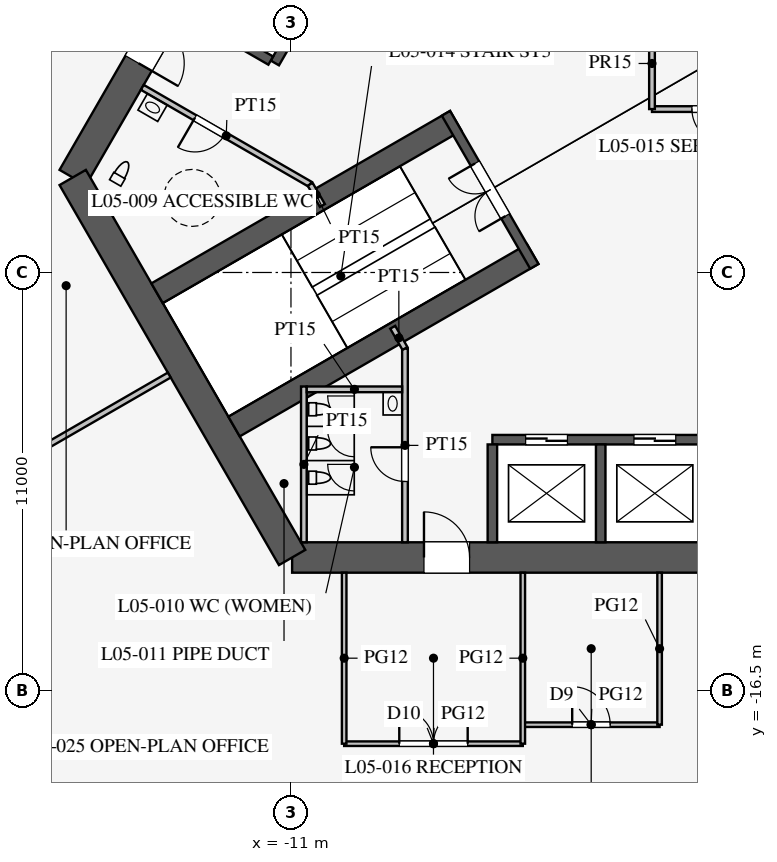
"""IFC4 building model, lengths in metres.
Left out: names, types, materials, properties, quantities, classifications, styles, units other than length and angle.
Written with IfcOpenShell. Run it as: python <this file> out.ifc"""

import sys

from ifc_helpers import new_model, si_unit, direction, frame, frame_2d, origin, place, context, subcontext, project, spatial, rectangle, extrude, element, fill, save


model = new_model("IFC4")
c1 = context("Model", 3, precision=1e-05, world=origin(), true_north=direction((0.0, 1.0)))
c2 = subcontext(c1, "Body", "Model", "MODEL_VIEW")
j1 = project(units=[si_unit("LENGTHUNIT", "METRE"), si_unit("PLANEANGLEUNIT", "RADIAN")], contexts=[c1])
p1 = place(None, origin())
s1 = spatial("IfcSite", under=j1, at=p1, CompositionType="ELEMENT")
p2 = place(p1, origin())
s2 = spatial("IfcBuilding", under=s1, at=p2, CompositionType="ELEMENT")
p3 = place(p2, frame((0.0, 0.0, 24.9)))
s3 = spatial("IfcBuildingStorey", under=s2, at=p3, CompositionType="ELEMENT", Elevation=24.9)
p4 = place(p3, frame((-10.97, -13.0, 0.0), z_axis=(0.0, 0.0, 1.0), x_axis=(1.0, 0.0, 0.0)))
e1 = element("IfcWall", 1, at=p4, inside=s3, PredefinedType="SHEAR", context=c2, shape_type="SweptSolid", body=[
    extrude(rectangle(XDim=21.939, YDim=0.8, at=frame_2d((10.97, 0.0))), origin(), (0.0, 0.0, 1.0), 4.2),
])
p5 = place(p4, frame((17.27, 0.0, 0.0)))
e2 = element("IfcOpeningElement", 2, at=p5, cuts=e1, PredefinedType="OPENING", context=c2, shape_type="SweptSolid", body=[
    extrude(rectangle(XDim=1.2, YDim=2.1, at=frame_2d((0.6, 1.05))), frame((0.0, 0.41, 0.0), z_axis=(0.0, -1.0, 0.0), x_axis=(1.0, 0.0, 0.0)), (0.0, 0.0, 1.0), 0.82),
])
p6 = place(p4, frame((3.47, 0.0, 0.0)))
e3 = element("IfcOpeningElement", 3, at=p6, cuts=e1, PredefinedType="OPENING", context=c2, shape_type="SweptSolid", body=[
    extrude(rectangle(XDim=1.2, YDim=2.1, at=frame_2d((0.6, 1.05))), frame((0.0, 0.41, 0.0), z_axis=(0.0, -1.0, 0.0), x_axis=(1.0, 0.0, 0.0)), (0.0, 0.0, 1.0), 0.82),
])
p7 = place(p3, frame((-5.773, 16.0, 0.0), z_axis=(0.0, 0.0, 1.0), x_axis=(-0.500002442456, -0.866023993627, 0.0)))
e4 = element("IfcWall", 4, at=p7, inside=s3, PredefinedType="SHEAR", context=c2, shape_type="SweptSolid", body=[
    extrude(rectangle(XDim=21.939, YDim=0.8, at=frame_2d((10.97, 0.0))), origin(), (0.0, 0.0, 1.0), 4.2),
])
p8 = place(p7, frame((17.27, 0.0, 0.0)))
e5 = element("IfcOpeningElement", 5, at=p8, cuts=e4, PredefinedType="OPENING", context=c2, shape_type="SweptSolid", body=[
    extrude(rectangle(XDim=1.2, YDim=2.1, at=frame_2d((0.6, 1.05))), frame((0.0, 0.41, 0.0), z_axis=(0.0, -1.0, 0.0), x_axis=(1.0, 0.0, 0.0)), (0.0, 0.0, 1.0), 0.82),
])
p9 = place(p7, frame((3.47, 0.0, 0.0)))
e6 = element("IfcOpeningElement", 6, at=p9, cuts=e4, PredefinedType="OPENING", context=c2, shape_type="SweptSolid", body=[
    extrude(rectangle(XDim=1.2, YDim=2.1, at=frame_2d((0.6, 1.05))), frame((0.0, 0.41, 0.0), z_axis=(0.0, -1.0, 0.0), x_axis=(1.0, 0.0, 0.0)), (0.0, 0.0, 1.0), 0.82),
])
p10 = place(p3, frame((-16.743, -3.0, 0.0), z_axis=(0.0, 0.0, 1.0), x_axis=(0.499995765644, -0.866027848477, 0.0)))
e7 = element("IfcWall", 7, at=p10, inside=s3, PredefinedType="SHEAR", context=c2, shape_type="SweptSolid", body=[
    extrude(rectangle(XDim=11.547, YDim=0.8, at=frame_2d((5.773, 0.0))), origin(), (0.0, 0.0, 1.0), 4.2),
])
p11 = place(p3, frame((-5.7, -9.9, 0.0), z_axis=(0.0, 0.0, 1.0), x_axis=(1.0, 0.0, 0.0)))
e8 = element("IfcWall", 8, at=p11, inside=s3, PredefinedType="SHEAR", context=c2, shape_type="SweptSolid", body=[
    extrude(rectangle(XDim=11.4, YDim=0.25, at=frame_2d((5.7, 0.0))), origin(), (0.0, 0.0, 1.0), 4.2),
])
p12 = place(p11, frame((0.875, 0.0, 0.0)))
e9 = element("IfcOpeningElement", 9, at=p12, cuts=e8, PredefinedType="OPENING", context=c2, shape_type="SweptSolid", body=[
    extrude(rectangle(XDim=1.1, YDim=2.2, at=frame_2d((0.55, 1.1))), frame((0.0, 0.135, 0.0), z_axis=(0.0, -1.0, 0.0), x_axis=(1.0, 0.0, 0.0)), (0.0, 0.0, 1.0), 0.27),
])
p13 = place(p11, frame((3.725, 0.0, 0.0)))
e10 = element("IfcOpeningElement", 10, at=p13, cuts=e8, PredefinedType="OPENING", context=c2, shape_type="SweptSolid", body=[
    extrude(rectangle(XDim=1.1, YDim=2.2, at=frame_2d((0.55, 1.1))), frame((0.0, 0.135, 0.0), z_axis=(0.0, -1.0, 0.0), x_axis=(1.0, 0.0, 0.0)), (0.0, 0.0, 1.0), 0.27),
])
p14 = place(p11, frame((6.575, 0.0, 0.0)))
e11 = element("IfcOpeningElement", 11, at=p14, cuts=e8, PredefinedType="OPENING", context=c2, shape_type="SweptSolid", body=[
    extrude(rectangle(XDim=1.1, YDim=2.2, at=frame_2d((0.55, 1.1))), frame((0.0, 0.135, 0.0), z_axis=(0.0, -1.0, 0.0), x_axis=(1.0, 0.0, 0.0)), (0.0, 0.0, 1.0), 0.27),
])
p15 = place(p11, frame((9.425, 0.0, 0.0)))
e12 = element("IfcOpeningElement", 12, at=p15, cuts=e8, PredefinedType="OPENING", context=c2, shape_type="SweptSolid", body=[
    extrude(rectangle(XDim=1.1, YDim=2.2, at=frame_2d((0.55, 1.1))), frame((0.0, 0.135, 0.0), z_axis=(0.0, -1.0, 0.0), x_axis=(1.0, 0.0, 0.0)), (0.0, 0.0, 1.0), 0.27),
])
for number, where, z_axis, x_axis in (
    (13, (-5.7, -10.025, 0.0), (0.0, 0.0, 1.0), (0.0, -1.0, 0.0)),
    (14, (-2.85, -10.025, 0.0), (0.0, 0.0, 1.0), (0.0, -1.0, 0.0)),
):
    element("IfcWall", number, at=place(p3, frame(where, z_axis=z_axis, x_axis=x_axis)), inside=s3, PredefinedType="SHEAR", context=c2, shape_type="SweptSolid", body=[
        extrude(rectangle(XDim=2.575, YDim=0.25, at=frame_2d((1.288, 0.0))), origin(), (0.0, 0.0, 1.0), 4.2),
    ])
p16 = place(p3, frame((-5.724, 9.886, 0.0), z_axis=(0.0, 0.0, 1.0), x_axis=(-0.500001763848, -0.866024385424, 0.0)))
e15 = element("IfcWall", 15, at=p16, inside=s3, PredefinedType="SHEAR", context=c2, shape_type="SweptSolid", body=[
    extrude(rectangle(XDim=11.4, YDim=0.25, at=frame_2d((5.7, 0.0))), origin(), (0.0, 0.0, 1.0), 4.2),
])
p17 = place(p16, frame((6.525, 0.0, 0.0)))
e16 = element("IfcOpeningElement", 16, at=p17, cuts=e15, PredefinedType="OPENING", context=c2, shape_type="SweptSolid", body=[
    extrude(rectangle(XDim=1.2, YDim=2.2, at=frame_2d((0.6, 1.1))), frame((0.0, 0.135, 0.0), z_axis=(0.0, -1.0, 0.0), x_axis=(1.0, 0.0, 0.0)), (0.0, 0.0, 1.0), 0.27),
])
p18 = place(p16, frame((9.375, 0.0, 0.0)))
e17 = element("IfcOpeningElement", 17, at=p18, cuts=e15, PredefinedType="OPENING", context=c2, shape_type="SweptSolid", body=[
    extrude(rectangle(XDim=1.2, YDim=2.2, at=frame_2d((0.6, 1.1))), frame((0.0, 0.135, 0.0), z_axis=(0.0, -1.0, 0.0), x_axis=(1.0, 0.0, 0.0)), (0.0, 0.0, 1.0), 0.27),
])
p19 = place(p3, frame((-11.532, 0.076, 0.0), z_axis=(0.0, 0.0, 1.0), x_axis=(-0.866005588531, 0.500034319456, 0.0)))
e18 = element("IfcWall", 18, at=p19, inside=s3, PredefinedType="SHEAR", context=c2, shape_type="SweptSolid", body=[
    extrude(rectangle(XDim=2.575, YDim=0.25, at=frame_2d((1.288, 0.0))), origin(), (0.0, 0.0, 1.0), 4.2),
])
for number, where, z_axis, x_axis in (
    (19, (-6.663, -1.509, 0.0), (0.0, 0.0, 1.0), (-0.866, -0.5, 0.0)),
    (20, (-4.638, -5.016, 0.0), (0.0, 0.0, 1.0), (-0.866, -0.5, 0.0)),
):
    element("IfcWall", number, at=place(p3, frame(where, z_axis=z_axis, x_axis=x_axis)), inside=s3, PredefinedType="SHEAR", context=c2, shape_type="SweptSolid", body=[
        extrude(rectangle(XDim=9.075, YDim=0.6, at=frame_2d((4.538, 0.0))), origin(), (0.0, 0.0, 1.0), 4.2),
    ])
p20 = place(p3, frame((-6.922, -1.312, 0.0), z_axis=(0.0, 0.0, 1.0), x_axis=(0.499984536904, -0.866034331223, 0.0)))
e21 = element("IfcWall", 21, at=p20, inside=s3, PredefinedType="SHEAR", context=c2, shape_type="SweptSolid", body=[
    extrude(rectangle(XDim=4.65, YDim=0.25, at=frame_2d((2.325, 0.0))), origin(), (0.0, 0.0, 1.0), 4.2),
])
p21 = place(p20, frame((1.525, 0.0, 0.0)))
e22 = element("IfcOpeningElement", 22, at=p21, cuts=e21, PredefinedType="OPENING", context=c2, shape_type="SweptSolid", body=[
    extrude(rectangle(XDim=1.6, YDim=2.1, at=frame_2d((0.8, 1.05))), frame((0.0, 0.135, 0.0), z_axis=(0.0, -1.0, 0.0), x_axis=(1.0, 0.0, 0.0)), (0.0, 0.0, 1.0), 0.27),
])
p22 = place(p3, frame((-8.0, -7.5, 0.0), z_axis=(0.0, 0.0, 1.0), x_axis=(0.0, -1.0, 0.0)))
e23 = element("IfcWall", 23, at=p22, inside=s3, PredefinedType="PARTITIONING", context=c2, shape_type="SweptSolid", body=[
    extrude(rectangle(XDim=5.1, YDim=0.15, at=frame_2d((2.55, 0.0))), origin(), (0.0, 0.0, 1.0), 4.0),
])
p23 = place(p22, frame((2.6, 0.0, 0.0)))
e24 = element("IfcOpeningElement", 24, at=p23, cuts=e23, PredefinedType="OPENING", context=c2, shape_type="SweptSolid", body=[
    extrude(rectangle(XDim=0.9, YDim=2.1, at=frame_2d((0.45, 1.05))), frame((0.0, 0.085, 0.0), z_axis=(0.0, -1.0, 0.0), x_axis=(1.0, 0.0, 0.0)), (0.0, 0.0, 1.0), 0.17),
])
p24 = place(p3, frame((-10.495, -3.178, 0.0), z_axis=(0.0, 0.0, 1.0), x_axis=(-0.86602216432, 0.500005610874, 0.0)))
e25 = element("IfcWall", 25, at=p24, inside=s3, PredefinedType="PARTITIONING", context=c2, shape_type="SweptSolid", body=[
    extrude(rectangle(XDim=5.1, YDim=0.15, at=frame_2d((2.55, 0.0))), origin(), (0.0, 0.0, 1.0), 4.0),
])
p25 = place(p24, frame((2.6, 0.0, 0.0)))
e26 = element("IfcOpeningElement", 26, at=p25, cuts=e25, PredefinedType="OPENING", context=c2, shape_type="SweptSolid", body=[
    extrude(rectangle(XDim=0.9, YDim=2.1, at=frame_2d((0.45, 1.05))), frame((0.0, 0.085, 0.0), z_axis=(0.0, -1.0, 0.0), x_axis=(1.0, 0.0, 0.0)), (0.0, 0.0, 1.0), 0.17),
])
for number, where, z_axis, x_axis in (
    (27, (-10.495, -3.178, 0.0), (0.0, 0.0, 1.0), (0.5, -0.866, 0.0)),
    (28, (-8.0, -7.5, 0.0), (0.0, 0.0, 1.0), (-0.5, 0.866, 0.0)),
):
    element("IfcWall", number, at=place(p3, frame(where, z_axis=z_axis, x_axis=x_axis)), inside=s3, PredefinedType="PARTITIONING", context=c2, shape_type="SweptSolid", body=[
        extrude(rectangle(XDim=0.645, YDim=0.15, at=frame_2d((0.323, 0.0))), origin(), (0.0, 0.0, 1.0), 4.0),
    ])
p26 = place(p3, frame((-10.66, -8.5, 0.0), z_axis=(0.0, 0.0, 1.0), x_axis=(0.0, -1.0, 0.0)))
e29 = element("IfcWall", 29, at=p26, inside=s3, PredefinedType="PARTITIONING", context=c2, shape_type="SweptSolid", body=[
    extrude(rectangle(XDim=4.1, YDim=0.15, at=frame_2d((2.05, 0.0))), origin(), (0.0, 0.0, 1.0), 4.0),
])
p27 = place(p3, frame((-8.075, -8.575, 0.0), z_axis=(0.0, 0.0, 1.0), x_axis=(-1.0, 0.0, 0.0)))
e30 = element("IfcWall", 30, at=p27, inside=s3, PredefinedType="PARTITIONING", context=c2, shape_type="SweptSolid", body=[
    extrude(rectangle(XDim=2.51, YDim=0.15, at=frame_2d((1.255, 0.0))), origin(), (0.0, 0.0, 1.0), 4.0),
])
p28 = place(p3, frame((-1.5, -1.2, 0.0), z_axis=(0.0, 0.0, 1.0), x_axis=(1.0, 0.0, 0.0)))
e31 = element("IfcWall", 31, at=p28, inside=s3, PredefinedType="PARTITIONING", context=c2, shape_type="SweptSolid", body=[
    extrude(rectangle(XDim=3.0, YDim=0.15, at=frame_2d((1.5, 0.0))), origin(), (0.0, 0.0, 1.0), 4.0),
])
p29 = place(p28, frame((1.05, 0.0, 0.0)))
e32 = element("IfcOpeningElement", 32, at=p29, cuts=e31, PredefinedType="OPENING", context=c2, shape_type="SweptSolid", body=[
    extrude(rectangle(XDim=0.9, YDim=2.1, at=frame_2d((0.45, 1.05))), frame((0.0, 0.085, 0.0), z_axis=(0.0, -1.0, 0.0), x_axis=(1.0, 0.0, 0.0)), (0.0, 0.0, 1.0), 0.17),
])
p30 = place(p3, frame((-1.5, 1.2, 0.0), z_axis=(0.0, 0.0, 1.0), x_axis=(0.0, -1.0, 0.0)))
e33 = element("IfcWall", 33, at=p30, inside=s3, PredefinedType="PARTITIONING", context=c2, shape_type="SweptSolid", body=[
    extrude(rectangle(XDim=2.4, YDim=0.15, at=frame_2d((1.2, 0.0))), origin(), (0.0, 0.0, 1.0), 4.0),
])
p31 = place(p3, frame((-14.203, -8.2, 0.0), z_axis=(0.0, 0.0, 1.0), x_axis=(-0.866024965723, -0.500000758745, 0.0)))
e34 = element("IfcWall", 34, at=p31, inside=s3, PredefinedType="PARTITIONING", context=c2, shape_type="SweptSolid", body=[
    extrude(rectangle(XDim=18.25, YDim=0.15, at=frame_2d((9.125, 0.0))), origin(), (0.0, 0.0, 1.0), 2.3),
])
p32 = place(p3, frame((-4.9, -17.4, 0.0), z_axis=(0.0, 0.0, 1.0), x_axis=(1.0, 0.0, 0.0)))
e35 = element("IfcWall", 35, at=p32, inside=s3, PredefinedType="PARTITIONING", context=c2, shape_type="SweptSolid", body=[
    extrude(rectangle(XDim=3.6, YDim=0.12, at=frame_2d((1.8, 0.0))), origin(), (0.0, 0.0, 1.0), 2.9),
])
p33 = place(p32, frame((1.3, 0.0, 0.15)))
e36 = element("IfcOpeningElement", 36, at=p33, cuts=e35, PredefinedType="OPENING", context=c2, shape_type="SweptSolid", body=[
    extrude(rectangle(XDim=1.0, YDim=2.1, at=frame_2d((0.5, 1.05))), frame((0.0, 0.07, 0.0), z_axis=(0.0, -1.0, 0.0), x_axis=(1.0, 0.0, 0.0)), (0.0, 0.0, 1.0), 0.14),
])
p34 = place(p3, frame((-9.6, -17.9, 0.0), z_axis=(0.0, 0.0, 1.0), x_axis=(1.0, 0.0, 0.0)))
e37 = element("IfcWall", 37, at=p34, inside=s3, PredefinedType="PARTITIONING", context=c2, shape_type="SweptSolid", body=[
    extrude(rectangle(XDim=4.7, YDim=0.12, at=frame_2d((2.35, 0.0))), origin(), (0.0, 0.0, 1.0), 2.9),
])
p35 = place(p34, frame((1.45, 0.0, 0.15)))
e38 = element("IfcOpeningElement", 38, at=p35, cuts=e37, PredefinedType="OPENING", context=c2, shape_type="SweptSolid", body=[
    extrude(rectangle(XDim=1.8, YDim=2.1, at=frame_2d((0.9, 1.05))), frame((0.0, 0.07, 0.0), z_axis=(0.0, -1.0, 0.0), x_axis=(1.0, 0.0, 0.0)), (0.0, 0.0, 1.0), 0.14),
])
p36 = place(p3, frame((-1.3, -13.4, 0.0), z_axis=(0.0, 0.0, 1.0), x_axis=(0.0, -1.0, 0.0)))
e39 = element("IfcWall", 39, at=p36, inside=s3, PredefinedType="PARTITIONING", context=c2, shape_type="SweptSolid", body=[
    extrude(rectangle(XDim=4.0, YDim=0.12, at=frame_2d((2.0, 0.0))), origin(), (0.0, 0.0, 1.0), 2.9),
])
for number, where, z_axis, x_axis in (
    (40, (-4.9, -13.4, 0.0), (0.0, 0.0, 1.0), (0.0, -1.0, 0.0)),
    (41, (-9.6, -13.4, 0.0), (0.0, 0.0, 1.0), (0.0, -1.0, 0.0)),
):
    element("IfcWall", number, at=place(p3, frame(where, z_axis=z_axis, x_axis=x_axis)), inside=s3, PredefinedType="PARTITIONING", context=c2, shape_type="SweptSolid", body=[
        extrude(rectangle(XDim=4.5, YDim=0.12, at=frame_2d((2.25, 0.0))), origin(), (0.0, 0.0, 1.0), 2.9),
    ])
p37 = place(p3, frame((-0.016, 30.491, 0.0), z_axis=(0.0, 0.0, 1.0), x_axis=(-0.50000091641, -0.866024874695, 0.0)))
e42 = element("IfcWall", 42, at=p37, inside=s3, PredefinedType="PARTITIONING", context=c2, shape_type="SweptSolid", body=[
    extrude(rectangle(XDim=52.796, YDim=0.12, at=frame_2d((26.398, 0.0))), origin(), (0.0, 0.0, 1.0), 2.9),
])
p38 = place(p37, frame((10.2, 0.0, 0.15)))
e43 = element("IfcOpeningElement", 43, at=p38, cuts=e42, PredefinedType="OPENING", context=c2, shape_type="SweptSolid", body=[
    extrude(rectangle(XDim=1.8, YDim=2.1, at=frame_2d((0.9, 1.05))), frame((0.0, 0.07, 0.0), z_axis=(0.0, -1.0, 0.0), x_axis=(1.0, 0.0, 0.0)), (0.0, 0.0, 1.0), 0.14),
])
p39 = place(p37, frame((40.8, 0.0, 0.15)))
e44 = element("IfcOpeningElement", 44, at=p39, cuts=e42, PredefinedType="OPENING", context=c2, shape_type="SweptSolid", body=[
    extrude(rectangle(XDim=1.8, YDim=2.1, at=frame_2d((0.9, 1.05))), frame((0.0, 0.07, 0.0), z_axis=(0.0, -1.0, 0.0), x_axis=(1.0, 0.0, 0.0)), (0.0, 0.0, 1.0), 0.14),
])
p40 = place(p23, frame((0.9, 0.0, 0.0), z_axis=(0.0, 0.0, 1.0), x_axis=(-1.0, 0.0, 0.0)))
e45 = element("IfcDoor", 45, at=p40, inside=s3, OperationType="SINGLE_SWING_RIGHT", PredefinedType="DOOR", context=c2, shape_type="SweptSolid", body=[
    extrude(rectangle(XDim=0.9, YDim=2.1, at=frame_2d((0.45, 1.05))), frame((0.0, 0.025, 0.0), z_axis=(0.0, -1.0, 0.0), x_axis=(1.0, 0.0, 0.0)), (0.0, 0.0, 1.0), 0.05),
])
fill(e24, e45)
p41 = place(p25, origin())
e46 = element("IfcDoor", 46, at=p41, inside=s3, OperationType="SINGLE_SWING_RIGHT", PredefinedType="DOOR", context=c2, shape_type="SweptSolid", body=[
    extrude(rectangle(XDim=0.9, YDim=2.1, at=frame_2d((0.45, 1.05))), frame((0.0, 0.025, 0.0), z_axis=(0.0, -1.0, 0.0), x_axis=(1.0, 0.0, 0.0)), (0.0, 0.0, 1.0), 0.05),
])
fill(e26, e46)
p42 = place(p29, frame((0.9, 0.0, 0.0), z_axis=(0.0, 0.0, 1.0), x_axis=(-1.0, 0.0, 0.0)))
e47 = element("IfcDoor", 47, at=p42, inside=s3, OperationType="SINGLE_SWING_LEFT", PredefinedType="DOOR", context=c2, shape_type="SweptSolid", body=[
    extrude(rectangle(XDim=0.9, YDim=2.1, at=frame_2d((0.45, 1.05))), frame((0.0, 0.025, 0.0), z_axis=(0.0, -1.0, 0.0), x_axis=(1.0, 0.0, 0.0)), (0.0, 0.0, 1.0), 0.05),
])
fill(e32, e47)
p43 = place(p21, frame((1.6, 0.0, 0.0), z_axis=(0.0, 0.0, 1.0), x_axis=(-1.0, 0.0, 0.0)))
e48 = element("IfcDoor", 48, at=p43, inside=s3, OperationType="DOUBLE_DOOR_SINGLE_SWING", PredefinedType="DOOR", context=c2, shape_type="SweptSolid", body=[
    extrude(rectangle(XDim=1.6, YDim=2.1, at=frame_2d((0.8, 1.05))), frame((0.0, 0.025, 0.0), z_axis=(0.0, -1.0, 0.0), x_axis=(1.0, 0.0, 0.0)), (0.0, 0.0, 1.0), 0.05),
])
fill(e22, e48)
p44 = place(p6, origin())
e49 = element("IfcDoor", 49, at=p44, inside=s3, OperationType="SINGLE_SWING_LEFT", PredefinedType="DOOR", context=c2, shape_type="SweptSolid", body=[
    extrude(rectangle(XDim=1.2, YDim=2.1, at=frame_2d((0.6, 1.05))), frame((0.0, 0.025, 0.0), z_axis=(0.0, -1.0, 0.0), x_axis=(1.0, 0.0, 0.0)), (0.0, 0.0, 1.0), 0.05),
])
fill(e3, e49)
p45 = place(p8, origin())
e50 = element("IfcDoor", 50, at=p45, inside=s3, OperationType="SINGLE_SWING_RIGHT", PredefinedType="DOOR", context=c2, shape_type="SweptSolid", body=[
    extrude(rectangle(XDim=1.2, YDim=2.1, at=frame_2d((0.6, 1.05))), frame((0.0, 0.025, 0.0), z_axis=(0.0, -1.0, 0.0), x_axis=(1.0, 0.0, 0.0)), (0.0, 0.0, 1.0), 0.05),
])
fill(e5, e50)
p46 = place(p35, origin())
e51 = element("IfcDoor", 51, at=p46, inside=s3, OperationType="DOUBLE_DOOR_SINGLE_SWING", PredefinedType="DOOR", context=c2, shape_type="SweptSolid", body=[
    extrude(rectangle(XDim=1.8, YDim=2.1, at=frame_2d((0.9, 1.05))), frame((0.0, 0.025, 0.0), z_axis=(0.0, -1.0, 0.0), x_axis=(1.0, 0.0, 0.0)), (0.0, 0.0, 1.0), 0.05),
])
fill(e38, e51)
p47 = place(p33, origin())
e52 = element("IfcDoor", 52, at=p47, inside=s3, OperationType="SINGLE_SWING_LEFT", PredefinedType="DOOR", context=c2, shape_type="SweptSolid", body=[
    extrude(rectangle(XDim=1.0, YDim=2.1, at=frame_2d((0.5, 1.05))), frame((0.0, 0.025, 0.0), z_axis=(0.0, -1.0, 0.0), x_axis=(1.0, 0.0, 0.0)), (0.0, 0.0, 1.0), 0.05),
])
fill(e36, e52)
p48 = place(p12, origin())
e53 = element("IfcDoor", 53, at=p48, inside=s3, OperationType="DOUBLE_DOOR_SLIDING", PredefinedType="DOOR", context=c2, shape_type="SweptSolid", body=[
    extrude(rectangle(XDim=1.1, YDim=2.2, at=frame_2d((0.55, 1.1))), frame((0.0, 0.025, 0.0), z_axis=(0.0, -1.0, 0.0), x_axis=(1.0, 0.0, 0.0)), (0.0, 0.0, 1.0), 0.05),
])
fill(e9, e53)
p49 = place(p13, origin())
e54 = element("IfcDoor", 54, at=p49, inside=s3, OperationType="DOUBLE_DOOR_SLIDING", PredefinedType="DOOR", context=c2, shape_type="SweptSolid", body=[
    extrude(rectangle(XDim=1.1, YDim=2.2, at=frame_2d((0.55, 1.1))), frame((0.0, 0.025, 0.0), z_axis=(0.0, -1.0, 0.0), x_axis=(1.0, 0.0, 0.0)), (0.0, 0.0, 1.0), 0.05),
])
fill(e10, e54)
save(model, sys.argv[1])
